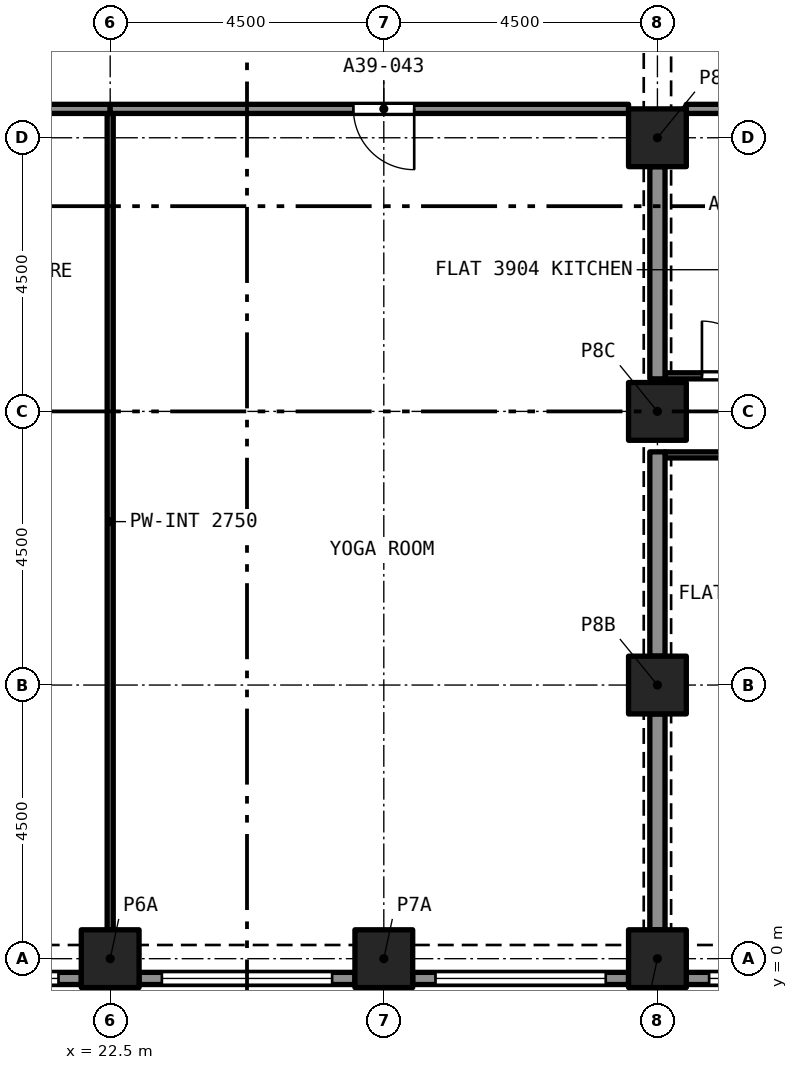
"""IFC4 building model, lengths in metres.
Left out: names, types, materials, properties, quantities, classifications, styles, units other than length and angle.
Written with IfcOpenShell. Run it as: python <this file> out.ifc"""

import sys

from ifc_helpers import new_model, si_unit, direction, frame, frame_2d, origin, origin_2d, place, context, subcontext, project, spatial, rectangle, extrude, element, fill, save


model = new_model("IFC4")
c1 = context("Model", 3, precision=1e-05, world=origin(), true_north=direction((0.0, 1.0)))
c2 = subcontext(c1, "Body", "Model", "MODEL_VIEW")
j1 = project(units=[si_unit("LENGTHUNIT", "METRE"), si_unit("PLANEANGLEUNIT", "RADIAN")], contexts=[c1])
p1 = place(None, origin())
s1 = spatial("IfcSite", under=j1, at=p1, CompositionType="ELEMENT")
p2 = place(p1, origin())
s2 = spatial("IfcBuilding", under=s1, at=p2, CompositionType="ELEMENT")
p3 = place(p2, frame((0.0, 0.0, 139.8)))
s3 = spatial("IfcBuildingStorey", under=s2, at=p3, CompositionType="ELEMENT", Elevation=139.8)
for number, where, z_axis, x_axis in (
    (1, (22.5, 0.0, 0.0), (0.0, 0.0, 1.0), (1.0, 0.0, 0.0)),
    (2, (27.0, 0.0, 0.0), (0.0, 0.0, 1.0), (1.0, 0.0, 0.0)),
    (3, (31.5, 0.0, 0.0), (0.0, 0.0, 1.0), (1.0, 0.0, 0.0)),
    (4, (31.5, 4.5, 0.0), (0.0, 0.0, 1.0), (1.0, 0.0, 0.0)),
    (5, (31.5, 9.0, 0.0), (0.0, 0.0, 1.0), (1.0, 0.0, 0.0)),
    (6, (31.5, 13.5, 0.0), (0.0, 0.0, 1.0), (1.0, 0.0, 0.0)),
):
    element("IfcColumn", number, at=place(p3, frame(where, z_axis=z_axis, x_axis=x_axis)), inside=s3, PredefinedType="COLUMN", context=c2, shape_type="SweptSolid", body=[
        extrude(rectangle(XDim=0.95, YDim=0.95, at=origin_2d()), origin(), (0.0, 0.0, 1.0), 3.2),
    ])
p4 = place(p3, frame((22.025, -0.325, 0.0), z_axis=(0.0, 0.0, 1.0), x_axis=(-1.0, 0.0, 0.0)))
e7 = element("IfcWall", 7, at=p4, inside=s3, PredefinedType="SOLIDWALL", context=c2, shape_type="SweptSolid", body=[
    extrude(rectangle(XDim=3.55, YDim=0.2, at=frame_2d((1.775, 0.0))), origin(), (0.0, 0.0, 1.0), 3.2),
])
p5 = place(p4, frame((0.375, 0.0, 0.45)))
e8 = element("IfcOpeningElement", 8, at=p5, cuts=e7, PredefinedType="OPENING", context=c2, shape_type="SweptSolid", body=[
    extrude(rectangle(XDim=2.8, YDim=1.95, at=frame_2d((1.4, 0.975))), frame((0.0, 0.11, 0.0), z_axis=(0.0, -1.0, 0.0), x_axis=(1.0, 0.0, 0.0)), (0.0, 0.0, 1.0), 0.22),
])
p6 = place(p3, frame((26.525, -0.325, 0.0), z_axis=(0.0, 0.0, 1.0), x_axis=(-1.0, 0.0, 0.0)))
e9 = element("IfcWall", 9, at=p6, inside=s3, PredefinedType="SOLIDWALL", context=c2, shape_type="SweptSolid", body=[
    extrude(rectangle(XDim=3.55, YDim=0.2, at=frame_2d((1.775, 0.0))), origin(), (0.0, 0.0, 1.0), 3.2),
])
p7 = place(p6, frame((0.375, 0.0, 0.45)))
e10 = element("IfcOpeningElement", 10, at=p7, cuts=e9, PredefinedType="OPENING", context=c2, shape_type="SweptSolid", body=[
    extrude(rectangle(XDim=2.8, YDim=1.95, at=frame_2d((1.4, 0.975))), frame((0.0, 0.11, 0.0), z_axis=(0.0, -1.0, 0.0), x_axis=(1.0, 0.0, 0.0)), (0.0, 0.0, 1.0), 0.22),
])
p8 = place(p3, frame((31.025, -0.325, 0.0), z_axis=(0.0, 0.0, 1.0), x_axis=(-1.0, 0.0, 0.0)))
e11 = element("IfcWall", 11, at=p8, inside=s3, PredefinedType="SOLIDWALL", context=c2, shape_type="SweptSolid", body=[
    extrude(rectangle(XDim=3.55, YDim=0.2, at=frame_2d((1.775, 0.0))), origin(), (0.0, 0.0, 1.0), 3.2),
])
p9 = place(p8, frame((0.375, 0.0, 0.45)))
e12 = element("IfcOpeningElement", 12, at=p9, cuts=e11, PredefinedType="OPENING", context=c2, shape_type="SweptSolid", body=[
    extrude(rectangle(XDim=2.8, YDim=1.95, at=frame_2d((1.4, 0.975))), frame((0.0, 0.11, 0.0), z_axis=(0.0, -1.0, 0.0), x_axis=(1.0, 0.0, 0.0)), (0.0, 0.0, 1.0), 0.22),
])
p10 = place(p3, frame((35.525, -0.325, 0.0), z_axis=(0.0, 0.0, 1.0), x_axis=(-1.0, 0.0, 0.0)))
e13 = element("IfcWall", 13, at=p10, inside=s3, PredefinedType="SOLIDWALL", context=c2, shape_type="SweptSolid", body=[
    extrude(rectangle(XDim=3.55, YDim=0.2, at=frame_2d((1.775, 0.0))), origin(), (0.0, 0.0, 1.0), 3.2),
])
p11 = place(p10, frame((0.375, 0.0, 0.45)))
e14 = element("IfcOpeningElement", 14, at=p11, cuts=e13, PredefinedType="OPENING", context=c2, shape_type="SweptSolid", body=[
    extrude(rectangle(XDim=2.8, YDim=1.95, at=frame_2d((1.4, 0.975))), frame((0.0, 0.11, 0.0), z_axis=(0.0, -1.0, 0.0), x_axis=(1.0, 0.0, 0.0)), (0.0, 0.0, 1.0), 0.22),
])
p12 = place(p3, frame((31.625, 9.585, 0.0), z_axis=(0.0, 0.0, 1.0), x_axis=(1.0, 0.0, 0.0)))
e15 = element("IfcWall", 15, at=p12, inside=s3, PredefinedType="PARTITIONING", context=c2, shape_type="SweptSolid", body=[
    extrude(rectangle(XDim=2.24, YDim=0.1, at=frame_2d((1.12, 0.0))), origin(), (0.0, 0.0, 1.0), 2.9),
])
p13 = place(p12, frame((0.607, 0.0, 0.0)))
e16 = element("IfcOpeningElement", 16, at=p13, cuts=e15, PredefinedType="OPENING", context=c2, shape_type="SweptSolid", body=[
    extrude(rectangle(XDim=0.9, YDim=2.1, at=frame_2d((0.45, 1.05))), frame((0.0, 0.06, 0.0), z_axis=(0.0, -1.0, 0.0), x_axis=(1.0, 0.0, 0.0)), (0.0, 0.0, 1.0), 0.12),
])
p14 = place(p3, frame((36.0, 8.285, 0.0), z_axis=(0.0, 0.0, 1.0), x_axis=(-1.0, 0.0, 0.0)))
e17 = element("IfcWall", 17, at=p14, inside=s3, PredefinedType="PARTITIONING", context=c2, shape_type="SweptSolid", body=[
    extrude(rectangle(XDim=4.375, YDim=0.1, at=frame_2d((2.188, 0.0))), origin(), (0.0, 0.0, 1.0), 2.9),
])
p15 = place(p14, frame((1.75, 0.0, 0.0)))
e18 = element("IfcOpeningElement", 18, at=p15, cuts=e17, PredefinedType="OPENING", context=c2, shape_type="SweptSolid", body=[
    extrude(rectangle(XDim=1.0, YDim=2.1, at=frame_2d((0.5, 1.05))), frame((0.0, 0.06, 0.0), z_axis=(0.0, -1.0, 0.0), x_axis=(1.0, 0.0, 0.0)), (0.0, 0.0, 1.0), 0.12),
])
p16 = place(p3, frame((31.5, 9.535, 0.0), z_axis=(0.0, 0.0, 1.0), x_axis=(0.0, 1.0, 0.0)))
e19 = element("IfcWall", 19, at=p16, inside=s3, PredefinedType="PARTITIONING", context=c2, shape_type="SweptSolid", body=[
    extrude(rectangle(XDim=3.49, YDim=0.25, at=frame_2d((1.745, 0.0))), origin(), (0.0, 0.0, 1.0), 2.38),
])
p17 = place(p3, frame((31.975, 13.975, 0.0), z_axis=(0.0, 0.0, 1.0), x_axis=(1.0, 0.0, 0.0)))
e20 = element("IfcWall", 20, at=p17, inside=s3, PredefinedType="PARTITIONING", context=c2, shape_type="SweptSolid", body=[
    extrude(rectangle(XDim=3.425, YDim=0.15, at=frame_2d((1.712, 0.0))), origin(), (0.0, 0.0, 1.0), 2.9),
])
p18 = place(p3, frame((31.5, 0.475, 0.0), z_axis=(0.0, 0.0, 1.0), x_axis=(0.0, 1.0, 0.0)))
e21 = element("IfcWall", 21, at=p18, inside=s3, PredefinedType="PARTITIONING", context=c2, shape_type="SweptSolid", body=[
    extrude(rectangle(XDim=3.55, YDim=0.25, at=frame_2d((1.775, 0.0))), origin(), (0.0, 0.0, 1.0), 2.38),
])
p19 = place(p3, frame((31.5, 4.975, 0.0), z_axis=(0.0, 0.0, 1.0), x_axis=(0.0, 1.0, 0.0)))
e22 = element("IfcWall", 22, at=p19, inside=s3, PredefinedType="PARTITIONING", context=c2, shape_type="SweptSolid", body=[
    extrude(rectangle(XDim=3.36, YDim=0.25, at=frame_2d((1.68, 0.0))), origin(), (0.0, 0.0, 1.0), 2.38),
])
p20 = place(p3, frame((22.5, 0.475, 0.0), z_axis=(0.0, 0.0, 1.0), x_axis=(0.0, 1.0, 0.0)))
e23 = element("IfcWall", 23, at=p20, inside=s3, PredefinedType="PARTITIONING", context=c2, shape_type="SweptSolid", body=[
    extrude(rectangle(XDim=13.425, YDim=0.1, at=frame_2d((6.712, 0.0))), origin(), (0.0, 0.0, 1.0), 2.75),
])
p21 = place(p3, frame((22.5, 13.975, 0.0), z_axis=(0.0, 0.0, 1.0), x_axis=(-1.0, 0.0, 0.0)))
e24 = element("IfcWall", 24, at=p21, inside=s3, PredefinedType="PARTITIONING", context=c2, shape_type="SweptSolid", body=[
    extrude(rectangle(XDim=4.025, YDim=0.15, at=frame_2d((2.012, 0.0))), origin(), (0.0, 0.0, 1.0), 2.75),
])
p22 = place(p21, frame((1.75, 0.0, 0.0)))
e25 = element("IfcOpeningElement", 25, at=p22, cuts=e24, PredefinedType="OPENING", context=c2, shape_type="SweptSolid", body=[
    extrude(rectangle(XDim=1.0, YDim=2.1, at=frame_2d((0.5, 1.05))), frame((0.0, 0.085, 0.0), z_axis=(0.0, -1.0, 0.0), x_axis=(1.0, 0.0, 0.0)), (0.0, 0.0, 1.0), 0.17),
])
p23 = place(p3, frame((31.025, 13.975, 0.0), z_axis=(0.0, 0.0, 1.0), x_axis=(-1.0, 0.0, 0.0)))
e26 = element("IfcWall", 26, at=p23, inside=s3, PredefinedType="PARTITIONING", context=c2, shape_type="SweptSolid", body=[
    extrude(rectangle(XDim=8.525, YDim=0.15, at=frame_2d((4.262, 0.0))), origin(), (0.0, 0.0, 1.0), 2.75),
])
p24 = place(p23, frame((3.525, 0.0, 0.0)))
e27 = element("IfcOpeningElement", 27, at=p24, cuts=e26, PredefinedType="OPENING", context=c2, shape_type="SweptSolid", body=[
    extrude(rectangle(XDim=1.0, YDim=2.1, at=frame_2d((0.5, 1.05))), frame((0.0, 0.085, 0.0), z_axis=(0.0, -1.0, 0.0), x_axis=(1.0, 0.0, 0.0)), (0.0, 0.0, 1.0), 0.17),
])
p25 = place(p5, origin())
e28 = element("IfcWindow", 28, at=p25, inside=s3, PartitioningType="SINGLE_PANEL", PredefinedType="WINDOW", context=c2, shape_type="SweptSolid", body=[
    extrude(rectangle(XDim=2.8, YDim=1.95, at=frame_2d((1.4, 0.975))), frame((0.0, 0.03, 0.0), z_axis=(0.0, -1.0, 0.0), x_axis=(1.0, 0.0, 0.0)), (0.0, 0.0, 1.0), 0.06),
])
fill(e8, e28)
p26 = place(p7, origin())
e29 = element("IfcWindow", 29, at=p26, inside=s3, PartitioningType="SINGLE_PANEL", PredefinedType="WINDOW", context=c2, shape_type="SweptSolid", body=[
    extrude(rectangle(XDim=2.8, YDim=1.95, at=frame_2d((1.4, 0.975))), frame((0.0, 0.03, 0.0), z_axis=(0.0, -1.0, 0.0), x_axis=(1.0, 0.0, 0.0)), (0.0, 0.0, 1.0), 0.06),
])
fill(e10, e29)
p27 = place(p9, origin())
e30 = element("IfcWindow", 30, at=p27, inside=s3, PartitioningType="SINGLE_PANEL", PredefinedType="WINDOW", context=c2, shape_type="SweptSolid", body=[
    extrude(rectangle(XDim=2.8, YDim=1.95, at=frame_2d((1.4, 0.975))), frame((0.0, 0.03, 0.0), z_axis=(0.0, -1.0, 0.0), x_axis=(1.0, 0.0, 0.0)), (0.0, 0.0, 1.0), 0.06),
])
fill(e12, e30)
p28 = place(p11, origin())
e31 = element("IfcWindow", 31, at=p28, inside=s3, PartitioningType="SINGLE_PANEL", PredefinedType="WINDOW", context=c2, shape_type="SweptSolid", body=[
    extrude(rectangle(XDim=2.8, YDim=1.95, at=frame_2d((1.4, 0.975))), frame((0.0, 0.03, 0.0), z_axis=(0.0, -1.0, 0.0), x_axis=(1.0, 0.0, 0.0)), (0.0, 0.0, 1.0), 0.06),
])
fill(e14, e31)
p29 = place(p13, origin())
e32 = element("IfcDoor", 32, at=p29, inside=s3, OperationType="SINGLE_SWING_LEFT", PredefinedType="DOOR", context=c2, shape_type="SweptSolid", body=[
    extrude(rectangle(XDim=0.9, YDim=2.1, at=frame_2d((0.45, 1.05))), frame((0.0, 0.025, 0.0), z_axis=(0.0, -1.0, 0.0), x_axis=(1.0, 0.0, 0.0)), (0.0, 0.0, 1.0), 0.05),
])
fill(e16, e32)
p30 = place(p24, origin())
e33 = element("IfcDoor", 33, at=p30, inside=s3, OperationType="SINGLE_SWING_LEFT", PredefinedType="DOOR", context=c2, shape_type="SweptSolid", body=[
    extrude(rectangle(XDim=1.0, YDim=2.1, at=frame_2d((0.5, 1.05))), frame((0.0, 0.025, 0.0), z_axis=(0.0, -1.0, 0.0), x_axis=(1.0, 0.0, 0.0)), (0.0, 0.0, 1.0), 0.05),
])
fill(e27, e33)
save(model, sys.argv[1])
